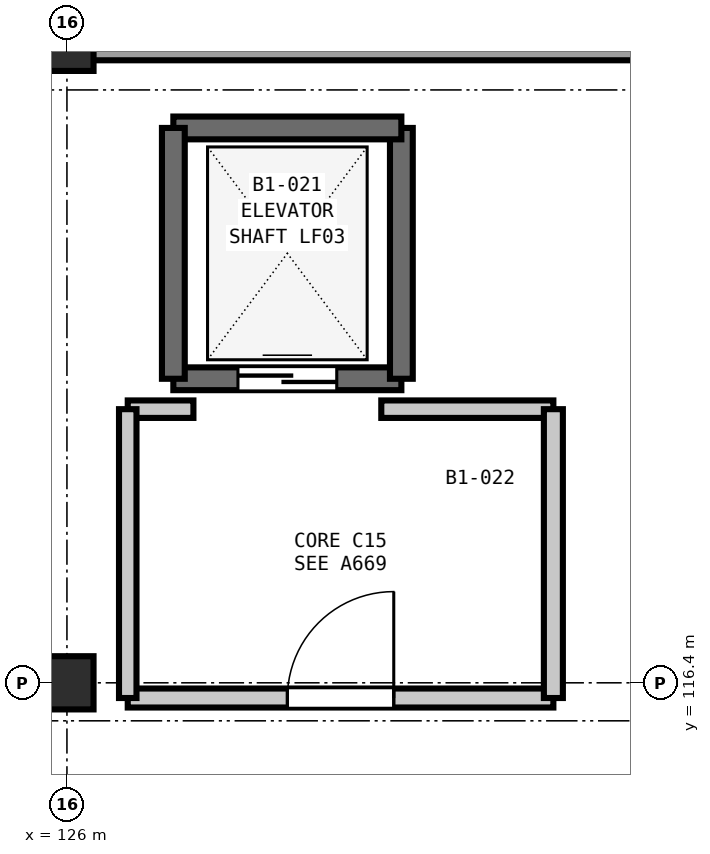
"""IFC4 building model, lengths in metres.
Left out: names, types, materials, properties, quantities, classifications, styles, units other than length and angle.
Written with IfcOpenShell. Run it as: python <this file> out.ifc"""

import sys

from ifc_helpers import new_model, si_unit, direction, frame, frame_2d, origin, origin_2d, place, context, subcontext, project, spatial, rectangle, extrude, element, fill, save


model = new_model("IFC4")
c1 = context("Model", 3, precision=1e-05, world=origin(), true_north=direction((0.0, 1.0)))
c2 = subcontext(c1, "Body", "Model", "MODEL_VIEW")
j1 = project(units=[si_unit("LENGTHUNIT", "METRE"), si_unit("PLANEANGLEUNIT", "RADIAN")], contexts=[c1])
p1 = place(None, origin())
s1 = spatial("IfcSite", under=j1, at=p1, CompositionType="ELEMENT")
p2 = place(p1, origin())
s2 = spatial("IfcBuilding", under=s1, at=p2, CompositionType="ELEMENT")
p3 = place(p2, frame((0.0, 0.0, -4.8)))
s3 = spatial("IfcBuildingStorey", under=s2, at=p3, CompositionType="ELEMENT", Elevation=-4.8)
for number, where, z_axis, x_axis in (
    (1, (126.0, 116.4, 0.0), (0.0, 0.0, 1.0), (1.0, 0.0, 0.0)),
    (2, (126.0, 124.8, 0.0), (0.0, 0.0, 1.0), (1.0, 0.0, 0.0)),
):
    element("IfcColumn", number, at=place(p3, frame(where, z_axis=z_axis, x_axis=x_axis)), inside=s3, PredefinedType="COLUMN", context=c2, shape_type="SweptSolid", body=[
        extrude(rectangle(XDim=0.7, YDim=0.7, at=origin_2d()), origin(), (0.0, 0.0, 1.0), 4.8),
    ])
for number, where, z_axis, x_axis in (
    (3, (117.6, 124.8, 0.0), (0.0, 0.0, 1.0), (1.0, 0.0, 0.0)),
    (4, (126.0, 124.8, 0.0), (0.0, 0.0, 1.0), (1.0, 0.0, 0.0)),
):
    element("IfcWall", number, at=place(p3, frame(where, z_axis=z_axis, x_axis=x_axis)), inside=s3, PredefinedType="SOLIDWALL", context=c2, shape_type="SweptSolid", body=[
        extrude(rectangle(XDim=8.4, YDim=0.42, at=frame_2d((4.2, 0.0))), origin(), (0.0, 0.0, 1.0), 4.05),
    ])
p4 = place(p3, frame((127.4, 120.4, 0.0), z_axis=(0.0, 0.0, 1.0), x_axis=(1.0, 0.0, 0.0)))
e5 = element("IfcWall", 5, at=p4, inside=s3, PredefinedType="SHEAR", context=c2, shape_type="SweptSolid", body=[
    extrude(rectangle(XDim=3.0, YDim=0.3, at=frame_2d((1.5, 0.0))), origin(), (0.0, 0.0, 1.0), 4.8),
])
p5 = place(p4, frame((0.85, 0.0, 0.0)))
e6 = element("IfcOpeningElement", 6, at=p5, cuts=e5, PredefinedType="OPENING", context=c2, shape_type="SweptSolid", body=[
    extrude(rectangle(XDim=1.3, YDim=2.2, at=frame_2d((0.65, 1.1))), frame((0.0, 0.16, 0.0), z_axis=(0.0, -1.0, 0.0), x_axis=(1.0, 0.0, 0.0)), (0.0, 0.0, 1.0), 0.32),
])
p6 = place(p3, frame((130.4, 120.4, 0.0), z_axis=(0.0, 0.0, 1.0), x_axis=(0.0, 1.0, 0.0)))
e7 = element("IfcWall", 7, at=p6, inside=s3, PredefinedType="SHEAR", context=c2, shape_type="SweptSolid", body=[
    extrude(rectangle(XDim=3.3, YDim=0.3, at=frame_2d((1.65, 0.0))), origin(), (0.0, 0.0, 1.0), 4.8),
])
p7 = place(p3, frame((130.4, 123.7, 0.0), z_axis=(0.0, 0.0, 1.0), x_axis=(-1.0, 0.0, 0.0)))
e8 = element("IfcWall", 8, at=p7, inside=s3, PredefinedType="SHEAR", context=c2, shape_type="SweptSolid", body=[
    extrude(rectangle(XDim=3.0, YDim=0.3, at=frame_2d((1.5, 0.0))), origin(), (0.0, 0.0, 1.0), 4.8),
])
p8 = place(p3, frame((127.4, 123.7, 0.0), z_axis=(0.0, 0.0, 1.0), x_axis=(0.0, -1.0, 0.0)))
e9 = element("IfcWall", 9, at=p8, inside=s3, PredefinedType="SHEAR", context=c2, shape_type="SweptSolid", body=[
    extrude(rectangle(XDim=3.3, YDim=0.3, at=frame_2d((1.65, 0.0))), origin(), (0.0, 0.0, 1.0), 4.8),
])
p9 = place(p3, frame((126.8, 116.2, 0.0), z_axis=(0.0, 0.0, 1.0), x_axis=(1.0, 0.0, 0.0)))
e10 = element("IfcWall", 10, at=p9, inside=s3, PredefinedType="PARTITIONING", context=c2, shape_type="SweptSolid", body=[
    extrude(rectangle(XDim=5.6, YDim=0.25, at=frame_2d((2.8, 0.0))), origin(), (0.0, 0.0, 1.0), 3.985),
])
p10 = place(p9, frame((2.1, 0.0, 0.0)))
e11 = element("IfcOpeningElement", 11, at=p10, cuts=e10, PredefinedType="OPENING", context=c2, shape_type="SweptSolid", body=[
    extrude(rectangle(XDim=1.4, YDim=2.2, at=frame_2d((0.7, 1.1))), frame((0.0, 0.135, 0.0), z_axis=(0.0, -1.0, 0.0), x_axis=(1.0, 0.0, 0.0)), (0.0, 0.0, 1.0), 0.27),
])
p11 = place(p3, frame((130.136, 120.0, 0.0), z_axis=(0.0, 0.0, 1.0), x_axis=(1.0, 0.0, 0.0)))
e12 = element("IfcWall", 12, at=p11, inside=s3, PredefinedType="PARTITIONING", context=c2, shape_type="SweptSolid", body=[
    extrude(rectangle(XDim=2.264, YDim=0.23, at=frame_2d((1.132, 0.0))), origin(), (0.0, 0.0, 1.0), 4.44),
])
p12 = place(p3, frame((126.8, 120.0, 0.0), z_axis=(0.0, 0.0, 1.0), x_axis=(1.0, 0.0, 0.0)))
e13 = element("IfcWall", 13, at=p12, inside=s3, PredefinedType="PARTITIONING", context=c2, shape_type="SweptSolid", body=[
    extrude(rectangle(XDim=0.864, YDim=0.23, at=frame_2d((0.432, 0.0))), origin(), (0.0, 0.0, 1.0), 4.44),
])
p13 = place(p3, frame((126.8, 116.2, 0.0), z_axis=(0.0, 0.0, 1.0), x_axis=(0.0, 1.0, 0.0)))
e14 = element("IfcWall", 14, at=p13, inside=s3, PredefinedType="PARTITIONING", context=c2, shape_type="SweptSolid", body=[
    extrude(rectangle(XDim=3.8, YDim=0.23, at=frame_2d((1.9, 0.0))), origin(), (0.0, 0.0, 1.0), 4.44),
])
p14 = place(p3, frame((132.4, 116.2, 0.0), z_axis=(0.0, 0.0, 1.0), x_axis=(0.0, 1.0, 0.0)))
e15 = element("IfcWall", 15, at=p14, inside=s3, PredefinedType="PARTITIONING", context=c2, shape_type="SweptSolid", body=[
    extrude(rectangle(XDim=3.8, YDim=0.25, at=frame_2d((1.9, 0.0))), origin(), (0.0, 0.0, 1.0), 4.44),
])
p15 = place(p5, origin())
e16 = element("IfcDoor", 16, at=p15, inside=s3, OperationType="DOUBLE_DOOR_SLIDING", PredefinedType="DOOR", context=c2, shape_type="SweptSolid", body=[
    extrude(rectangle(XDim=1.3, YDim=2.2, at=frame_2d((0.65, 1.1))), frame((0.0, 0.025, 0.0), z_axis=(0.0, -1.0, 0.0), x_axis=(1.0, 0.0, 0.0)), (0.0, 0.0, 1.0), 0.05),
])
fill(e6, e16)
p16 = place(p10, origin())
e17 = element("IfcDoor", 17, at=p16, inside=s3, OperationType="SINGLE_SWING_RIGHT", PredefinedType="DOOR", context=c2, shape_type="SweptSolid", body=[
    extrude(rectangle(XDim=1.4, YDim=2.2, at=frame_2d((0.7, 1.1))), frame((0.0, 0.025, 0.0), z_axis=(0.0, -1.0, 0.0), x_axis=(1.0, 0.0, 0.0)), (0.0, 0.0, 1.0), 0.05),
])
fill(e11, e17)
save(model, sys.argv[1])
